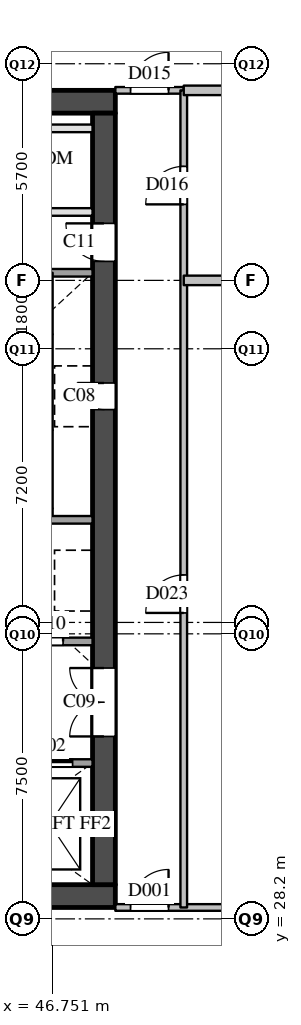
"""IFC4 building model, lengths in metres.
Left out: names, types, materials, properties, quantities, classifications, styles, units other than length and angle.
Written with IfcOpenShell. Run it as: python <this file> out.ifc"""

import sys

from ifc_helpers import new_model, si_unit, direction, frame, frame_2d, origin, place, context, subcontext, project, spatial, rectangle, extrude, element, fill, save


model = new_model("IFC4")
c1 = context("Model", 3, precision=1e-05, world=origin(), true_north=direction((0.0, 1.0)))
c2 = subcontext(c1, "Body", "Model", "MODEL_VIEW")
j1 = project(units=[si_unit("LENGTHUNIT", "METRE"), si_unit("PLANEANGLEUNIT", "RADIAN")], contexts=[c1])
p1 = place(None, origin())
s1 = spatial("IfcSite", under=j1, at=p1, CompositionType="ELEMENT")
p2 = place(p1, origin())
s2 = spatial("IfcBuilding", under=s1, at=p2, CompositionType="ELEMENT")
p3 = place(p2, frame((0.0, 0.0, 14.0)))
s3 = spatial("IfcBuildingStorey", under=s2, at=p3, CompositionType="ELEMENT", Elevation=14.0)
for number, where, z_axis, x_axis in (
    (1, (36.0, 28.8, 0.0), (0.0, 0.0, 1.0), (1.0, 0.0, 0.0)),
    (2, (36.0, 49.7, 0.0), (0.0, 0.0, 1.0), (1.0, 0.0, 0.0)),
):
    element("IfcWall", number, at=place(p3, frame(where, z_axis=z_axis, x_axis=x_axis)), inside=s3, PredefinedType="SHEAR", context=c2, shape_type="SweptSolid", body=[
        extrude(rectangle(XDim=12.4, YDim=0.6, at=frame_2d((6.2, 0.0))), origin(), (0.0, 0.0, 1.0), 6.59),
    ])
p4 = place(p3, frame((48.1, 29.1, 0.0), z_axis=(0.0, 0.0, 1.0), x_axis=(0.0, 1.0, 0.0)))
e3 = element("IfcWall", 3, at=p4, inside=s3, PredefinedType="SHEAR", context=c2, shape_type="SweptSolid", body=[
    extrude(rectangle(XDim=20.3, YDim=0.6, at=frame_2d((10.15, 0.0))), origin(), (0.0, 0.0, 1.0), 6.59),
])
p5 = place(p4, frame((12.5, 0.0, 0.0)))
e4 = element("IfcOpeningElement", 4, at=p5, cuts=e3, PredefinedType="OPENING", context=c2, shape_type="SweptSolid", body=[
    extrude(rectangle(XDim=0.7, YDim=2.1, at=frame_2d((0.35, 1.05))), frame((0.0, 0.31, 0.0), z_axis=(0.0, -1.0, 0.0), x_axis=(1.0, 0.0, 0.0)), (0.0, 0.0, 1.0), 0.62),
])
p6 = place(p4, frame((3.9, 0.0, 0.0)))
e5 = element("IfcOpeningElement", 5, at=p6, cuts=e3, PredefinedType="OPENING", context=c2, shape_type="SweptSolid", body=[
    extrude(rectangle(XDim=1.8, YDim=2.1, at=frame_2d((0.9, 1.05))), frame((0.0, 0.31, 0.0), z_axis=(0.0, -1.0, 0.0), x_axis=(1.0, 0.0, 0.0)), (0.0, 0.0, 1.0), 0.62),
])
p7 = place(p4, frame((16.4, 0.0, 0.0)))
e6 = element("IfcOpeningElement", 6, at=p7, cuts=e3, PredefinedType="OPENING", context=c2, shape_type="SweptSolid", body=[
    extrude(rectangle(XDim=1.0, YDim=2.1, at=frame_2d((0.5, 1.05))), frame((0.0, 0.31, 0.0), z_axis=(0.0, -1.0, 0.0), x_axis=(1.0, 0.0, 0.0)), (0.0, 0.0, 1.0), 0.62),
])
p8 = place(p3, frame((36.6, 32.3, 0.0), z_axis=(0.0, 0.0, 1.0), x_axis=(1.0, 0.0, 0.0)))
e7 = element("IfcWall", 7, at=p8, inside=s3, PredefinedType="SOLIDWALL", context=c2, shape_type="SweptSolid", body=[
    extrude(rectangle(XDim=11.2, YDim=0.2, at=frame_2d((5.6, 0.0))), origin(), (0.0, 0.0, 1.0), 6.59),
])
p9 = place(p8, frame((7.225, 0.0, 0.0)))
e8 = element("IfcOpeningElement", 8, at=p9, cuts=e7, PredefinedType="OPENING", context=c2, shape_type="SweptSolid", body=[
    extrude(rectangle(XDim=1.2, YDim=2.1, at=frame_2d((0.6, 1.05))), frame((0.0, 0.11, 0.0), z_axis=(0.0, -1.0, 0.0), x_axis=(1.0, 0.0, 0.0)), (0.0, 0.0, 1.0), 0.22),
])
p10 = place(p8, frame((9.475, 0.0, 0.0)))
e9 = element("IfcOpeningElement", 9, at=p10, cuts=e7, PredefinedType="OPENING", context=c2, shape_type="SweptSolid", body=[
    extrude(rectangle(XDim=1.2, YDim=2.1, at=frame_2d((0.6, 1.05))), frame((0.0, 0.11, 0.0), z_axis=(0.0, -1.0, 0.0), x_axis=(1.0, 0.0, 0.0)), (0.0, 0.0, 1.0), 0.22),
])
p11 = place(p3, frame((43.3, 35.5, 0.0), z_axis=(0.0, 0.0, 1.0), x_axis=(1.0, 0.0, 0.0)))
e10 = element("IfcWall", 10, at=p11, inside=s3, PredefinedType="SOLIDWALL", context=c2, shape_type="SweptSolid", body=[
    extrude(rectangle(XDim=4.5, YDim=0.2, at=frame_2d((2.25, 0.0))), origin(), (0.0, 0.0, 1.0), 6.59),
])
p12 = place(p11, frame((0.525, 0.0, 0.0)))
e11 = element("IfcOpeningElement", 11, at=p12, cuts=e10, PredefinedType="OPENING", context=c2, shape_type="SweptSolid", body=[
    extrude(rectangle(XDim=1.2, YDim=2.1, at=frame_2d((0.6, 1.05))), frame((0.0, 0.11, 0.0), z_axis=(0.0, -1.0, 0.0), x_axis=(1.0, 0.0, 0.0)), (0.0, 0.0, 1.0), 0.22),
])
p13 = place(p11, frame((3.025, 0.0, 0.0)))
e12 = element("IfcOpeningElement", 12, at=p13, cuts=e10, PredefinedType="OPENING", context=c2, shape_type="SweptSolid", body=[
    extrude(rectangle(XDim=0.7, YDim=2.1, at=frame_2d((0.35, 1.05))), frame((0.0, 0.11, 0.0), z_axis=(0.0, -1.0, 0.0), x_axis=(1.0, 0.0, 0.0)), (0.0, 0.0, 1.0), 0.22),
])
p14 = place(p3, frame((43.3, 38.7, 0.0), z_axis=(0.0, 0.0, 1.0), x_axis=(1.0, 0.0, 0.0)))
e13 = element("IfcWall", 13, at=p14, inside=s3, PredefinedType="SOLIDWALL", context=c2, shape_type="SweptSolid", body=[
    extrude(rectangle(XDim=4.5, YDim=0.2, at=frame_2d((2.25, 0.0))), origin(), (0.0, 0.0, 1.0), 6.59),
])
p15 = place(p3, frame((46.65, 45.2, 0.0), z_axis=(0.0, 0.0, 1.0), x_axis=(1.0, 0.0, 0.0)))
e14 = element("IfcWall", 14, at=p15, inside=s3, PredefinedType="SOLIDWALL", context=c2, shape_type="SweptSolid", body=[
    extrude(rectangle(XDim=1.15, YDim=0.2, at=frame_2d((0.575, 0.0))), origin(), (0.0, 0.0, 1.0), 6.59),
])
p16 = place(p3, frame((36.6, 46.8, 0.0), z_axis=(0.0, 0.0, 1.0), x_axis=(1.0, 0.0, 0.0)))
e15 = element("IfcWall", 15, at=p16, inside=s3, PredefinedType="PARTITIONING", context=c2, shape_type="SweptSolid", body=[
    extrude(rectangle(XDim=11.2, YDim=0.2, at=frame_2d((5.6, 0.0))), origin(), (0.0, 0.0, 1.0), 6.59),
])
p17 = place(p16, frame((5.15, 0.0, 0.0)))
e16 = element("IfcOpeningElement", 16, at=p17, cuts=e15, PredefinedType="OPENING", context=c2, shape_type="SweptSolid", body=[
    extrude(rectangle(XDim=0.9, YDim=2.1, at=frame_2d((0.45, 1.05))), frame((0.0, 0.11, 0.0), z_axis=(0.0, -1.0, 0.0), x_axis=(1.0, 0.0, 0.0)), (0.0, 0.0, 1.0), 0.22),
])
p18 = place(p3, frame((36.6, 49.0, 0.0), z_axis=(0.0, 0.0, 1.0), x_axis=(1.0, 0.0, 0.0)))
e17 = element("IfcWall", 17, at=p18, inside=s3, PredefinedType="PARTITIONING", context=c2, shape_type="SweptSolid", body=[
    extrude(rectangle(XDim=11.2, YDim=0.2, at=frame_2d((5.6, 0.0))), origin(), (0.0, 0.0, 1.0), 6.59),
])
p19 = place(p3, frame((48.4, 28.5, 0.0), z_axis=(0.0, 0.0, 1.0), x_axis=(1.0, 0.0, 0.0)))
e18 = element("IfcWall", 18, at=p19, inside=s3, PredefinedType="PARTITIONING", context=c2, shape_type="SweptSolid", body=[
    extrude(rectangle(XDim=5.6, YDim=0.175, at=frame_2d((2.8, 0.0))), origin(), (0.0, 0.0, 1.0), 5.59),
])
p20 = place(p19, frame((0.4, 0.0, 0.0)))
e19 = element("IfcOpeningElement", 19, at=p20, cuts=e18, PredefinedType="OPENING", context=c2, shape_type="SweptSolid", body=[
    extrude(rectangle(XDim=1.0, YDim=2.1, at=frame_2d((0.5, 1.05))), frame((0.0, 0.097, 0.0), z_axis=(0.0, -1.0, 0.0), x_axis=(1.0, 0.0, 0.0)), (0.0, 0.0, 1.0), 0.195),
])
p21 = place(p3, frame((48.4, 50.0, 0.0), z_axis=(0.0, 0.0, 1.0), x_axis=(1.0, 0.0, 0.0)))
e20 = element("IfcWall", 20, at=p21, inside=s3, PredefinedType="PARTITIONING", context=c2, shape_type="SweptSolid", body=[
    extrude(rectangle(XDim=1.8, YDim=0.175, at=frame_2d((0.9, 0.0))), origin(), (0.0, 0.0, 1.0), 6.59),
])
p22 = place(p21, frame((0.4, 0.0, 0.0)))
e21 = element("IfcOpeningElement", 21, at=p22, cuts=e20, PredefinedType="OPENING", context=c2, shape_type="SweptSolid", body=[
    extrude(rectangle(XDim=1.0, YDim=2.1, at=frame_2d((0.5, 1.05))), frame((0.0, 0.097, 0.0), z_axis=(0.0, -1.0, 0.0), x_axis=(1.0, 0.0, 0.0)), (0.0, 0.0, 1.0), 0.195),
])
p23 = place(p3, frame((50.2, 28.5, 0.0), z_axis=(0.0, 0.0, 1.0), x_axis=(0.0, 1.0, 0.0)))
e22 = element("IfcWall", 22, at=p23, inside=s3, PredefinedType="PARTITIONING", context=c2, shape_type="SweptSolid", body=[
    extrude(rectangle(XDim=21.5, YDim=0.175, at=frame_2d((10.75, 0.0))), origin(), (0.0, 0.0, 1.0), 6.59),
])
p24 = place(p23, frame((18.5, 0.0, 0.0)))
e23 = element("IfcOpeningElement", 23, at=p24, cuts=e22, PredefinedType="OPENING", context=c2, shape_type="SweptSolid", body=[
    extrude(rectangle(XDim=1.0, YDim=2.1, at=frame_2d((0.5, 1.05))), frame((0.0, 0.097, 0.0), z_axis=(0.0, -1.0, 0.0), x_axis=(1.0, 0.0, 0.0)), (0.0, 0.0, 1.0), 0.195),
])
p25 = place(p23, frame((7.75, 0.0, 0.0)))
e24 = element("IfcOpeningElement", 24, at=p25, cuts=e22, PredefinedType="OPENING", context=c2, shape_type="SweptSolid", body=[
    extrude(rectangle(XDim=1.0, YDim=2.1, at=frame_2d((0.5, 1.05))), frame((0.0, 0.097, 0.0), z_axis=(0.0, -1.0, 0.0), x_axis=(1.0, 0.0, 0.0)), (0.0, 0.0, 1.0), 0.195),
])
p26 = place(p3, frame((50.2, 45.0, 0.0), z_axis=(0.0, 0.0, 1.0), x_axis=(1.0, 0.0, 0.0)))
e25 = element("IfcWall", 25, at=p26, inside=s3, PredefinedType="PARTITIONING", context=c2, shape_type="SweptSolid", body=[
    extrude(rectangle(XDim=3.8, YDim=0.25, at=frame_2d((1.9, 0.0))), origin(), (0.0, 0.0, 1.0), 6.59),
])
p27 = place(p3, frame((50.2, 50.0, 0.0), z_axis=(0.0, 0.0, 1.0), x_axis=(1.0, 0.0, 0.0)))
e26 = element("IfcWall", 26, at=p27, inside=s3, PredefinedType="PARTITIONING", context=c2, shape_type="SweptSolid", body=[
    extrude(rectangle(XDim=3.7, YDim=0.25, at=frame_2d((1.85, 0.0))), origin(), (0.0, 0.0, 1.0), 5.59),
])
p28 = place(p10, origin())
e27 = element("IfcDoor", 27, at=p28, inside=s3, OperationType="SLIDING_TO_LEFT", PredefinedType="DOOR", context=c2, shape_type="SweptSolid", body=[
    extrude(rectangle(XDim=1.2, YDim=2.1, at=frame_2d((0.6, 1.05))), frame((0.0, 0.025, 0.0), z_axis=(0.0, -1.0, 0.0), x_axis=(1.0, 0.0, 0.0)), (0.0, 0.0, 1.0), 0.05),
])
fill(e9, e27)
p29 = place(p5, origin())
e28 = element("IfcDoor", 28, at=p29, inside=s3, OperationType="SINGLE_SWING_RIGHT", PredefinedType="DOOR", context=c2, shape_type="SweptSolid", body=[
    extrude(rectangle(XDim=0.7, YDim=2.1, at=frame_2d((0.35, 1.05))), frame((0.0, 0.025, 0.0), z_axis=(0.0, -1.0, 0.0), x_axis=(1.0, 0.0, 0.0)), (0.0, 0.0, 1.0), 0.05),
])
fill(e4, e28)
p30 = place(p6, origin())
e29 = element("IfcDoor", 29, at=p30, inside=s3, OperationType="DOUBLE_DOOR_SINGLE_SWING", PredefinedType="DOOR", context=c2, shape_type="SweptSolid", body=[
    extrude(rectangle(XDim=1.8, YDim=2.1, at=frame_2d((0.9, 1.05))), frame((0.0, 0.025, 0.0), z_axis=(0.0, -1.0, 0.0), x_axis=(1.0, 0.0, 0.0)), (0.0, 0.0, 1.0), 0.05),
])
fill(e5, e29)
p31 = place(p13, origin())
e30 = element("IfcDoor", 30, at=p31, inside=s3, OperationType="SINGLE_SWING_RIGHT", PredefinedType="DOOR", context=c2, shape_type="SweptSolid", body=[
    extrude(rectangle(XDim=0.7, YDim=2.1, at=frame_2d((0.35, 1.05))), frame((0.0, 0.025, 0.0), z_axis=(0.0, -1.0, 0.0), x_axis=(1.0, 0.0, 0.0)), (0.0, 0.0, 1.0), 0.05),
])
fill(e12, e30)
p32 = place(p7, origin())
e31 = element("IfcDoor", 31, at=p32, inside=s3, OperationType="SINGLE_SWING_RIGHT", PredefinedType="DOOR", context=c2, shape_type="SweptSolid", body=[
    extrude(rectangle(XDim=1.0, YDim=2.1, at=frame_2d((0.5, 1.05))), frame((0.0, 0.025, 0.0), z_axis=(0.0, -1.0, 0.0), x_axis=(1.0, 0.0, 0.0)), (0.0, 0.0, 1.0), 0.05),
])
fill(e6, e31)
p33 = place(p20, origin())
e32 = element("IfcDoor", 32, at=p33, inside=s3, OperationType="SINGLE_SWING_RIGHT", PredefinedType="DOOR", context=c2, shape_type="SweptSolid", body=[
    extrude(rectangle(XDim=1.0, YDim=2.1, at=frame_2d((0.5, 1.05))), frame((0.0, 0.025, 0.0), z_axis=(0.0, -1.0, 0.0), x_axis=(1.0, 0.0, 0.0)), (0.0, 0.0, 1.0), 0.05),
])
fill(e19, e32)
p34 = place(p22, origin())
e33 = element("IfcDoor", 33, at=p34, inside=s3, OperationType="SINGLE_SWING_RIGHT", PredefinedType="DOOR", context=c2, shape_type="SweptSolid", body=[
    extrude(rectangle(XDim=1.0, YDim=2.1, at=frame_2d((0.5, 1.05))), frame((0.0, 0.025, 0.0), z_axis=(0.0, -1.0, 0.0), x_axis=(1.0, 0.0, 0.0)), (0.0, 0.0, 1.0), 0.05),
])
fill(e21, e33)
p35 = place(p24, origin())
e34 = element("IfcDoor", 34, at=p35, inside=s3, OperationType="SINGLE_SWING_LEFT", PredefinedType="DOOR", context=c2, shape_type="SweptSolid", body=[
    extrude(rectangle(XDim=1.0, YDim=2.1, at=frame_2d((0.5, 1.05))), frame((0.0, 0.025, 0.0), z_axis=(0.0, -1.0, 0.0), x_axis=(1.0, 0.0, 0.0)), (0.0, 0.0, 1.0), 0.05),
])
fill(e23, e34)
p36 = place(p25, origin())
e35 = element("IfcDoor", 35, at=p36, inside=s3, OperationType="SINGLE_SWING_LEFT", PredefinedType="DOOR", context=c2, shape_type="SweptSolid", body=[
    extrude(rectangle(XDim=1.0, YDim=2.1, at=frame_2d((0.5, 1.05))), frame((0.0, 0.025, 0.0), z_axis=(0.0, -1.0, 0.0), x_axis=(1.0, 0.0, 0.0)), (0.0, 0.0, 1.0), 0.05),
])
fill(e24, e35)
save(model, sys.argv[1])
